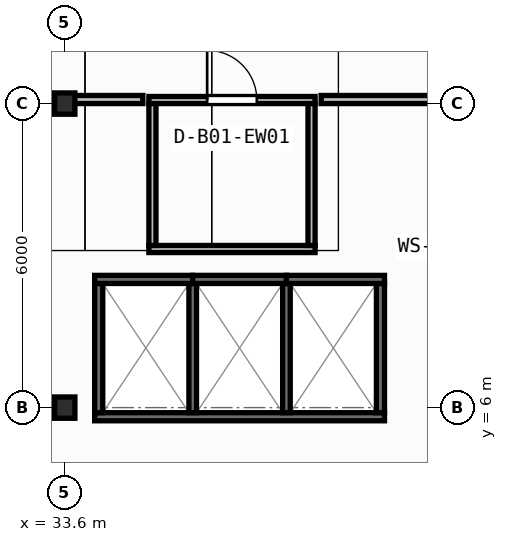
"""IFC4 building model, lengths in metres.
Left out: names, types, materials, properties, quantities, classifications, styles, units other than length and angle.
Written with IfcOpenShell. Run it as: python <this file> out.ifc"""

import sys

from ifc_helpers import new_model, si_unit, direction, frame, frame_2d, origin, origin_2d, place, context, subcontext, project, spatial, rectangle, i_section, extrude, element, fill, save


model = new_model("IFC4")
c1 = context("Model", 3, precision=1e-05, world=origin(), true_north=direction((0.0, 1.0)))
c2 = subcontext(c1, "Body", "Model", "MODEL_VIEW")
j1 = project(units=[si_unit("LENGTHUNIT", "METRE"), si_unit("PLANEANGLEUNIT", "RADIAN")], contexts=[c1])
p1 = place(None, origin())
s1 = spatial("IfcSite", under=j1, at=p1, CompositionType="ELEMENT")
p2 = place(p1, origin())
s2 = spatial("IfcBuilding", under=s1, at=p2, CompositionType="ELEMENT")
p3 = place(p2, frame((0.0, 0.0, -4.5)))
s3 = spatial("IfcBuildingStorey", under=s2, at=p3, CompositionType="ELEMENT", Elevation=-4.5)
for number, where, z_axis, x_axis in (
    (1, (33.6, 6.0, 0.0), (0.0, 0.0, 1.0), (1.0, 0.0, 0.0)),
    (2, (33.6, 12.0, 0.0), (0.0, 0.0, 1.0), (1.0, 0.0, 0.0)),
):
    element("IfcColumn", number, at=place(p3, frame(where, z_axis=z_axis, x_axis=x_axis)), inside=s3, PredefinedType="COLUMN", context=c2, shape_type="SweptSolid", body=[
        extrude(i_section(OverallWidth=0.4, OverallDepth=0.42, WebThickness=0.025, FlangeThickness=0.04, at=origin_2d()), origin(), (0.0, 0.0, 1.0), 4.5),
    ])
p4 = place(p3, frame((34.19, 5.82, 0.0), z_axis=(0.0, 0.0, 1.0), x_axis=(1.0, 0.0, 0.0)))
e3 = element("IfcWall", 3, at=p4, inside=s3, PredefinedType="SHEAR", context=c2, shape_type="SweptSolid", body=[
    extrude(rectangle(XDim=5.72, YDim=0.16, at=frame_2d((2.86, 0.0))), origin(), (0.0, 0.0, 1.0), 4.25),
])
for number, where, z_axis, x_axis in (
    (4, (34.27, 5.9, 0.0), (0.0, 0.0, 1.0), (0.0, 1.0, 0.0)),
    (5, (39.83, 5.9, 0.0), (0.0, 0.0, 1.0), (0.0, 1.0, 0.0)),
):
    element("IfcWall", number, at=place(p3, frame(where, z_axis=z_axis, x_axis=x_axis)), inside=s3, PredefinedType="SHEAR", context=c2, shape_type="SweptSolid", body=[
        extrude(rectangle(XDim=2.55, YDim=0.16, at=frame_2d((1.275, 0.0))), origin(), (0.0, 0.0, 1.0), 4.25),
    ])
for number, where, z_axis, x_axis in (
    (6, (36.125, 5.9, 0.0), (0.0, 0.0, 1.0), (0.0, 1.0, 0.0)),
    (7, (37.975, 5.9, 0.0), (0.0, 0.0, 1.0), (0.0, 1.0, 0.0)),
):
    element("IfcWall", number, at=place(p3, frame(where, z_axis=z_axis, x_axis=x_axis)), inside=s3, PredefinedType="SHEAR", context=c2, shape_type="SweptSolid", body=[
        extrude(rectangle(XDim=2.55, YDim=0.15, at=frame_2d((1.275, 0.0))), origin(), (0.0, 0.0, 1.0), 4.25),
    ])
p5 = place(p3, frame((34.19, 8.53, 0.0), z_axis=(0.0, 0.0, 1.0), x_axis=(1.0, 0.0, 0.0)))
e8 = element("IfcWall", 8, at=p5, inside=s3, PredefinedType="SHEAR", context=c2, shape_type="SweptSolid", body=[
    extrude(rectangle(XDim=1.935, YDim=0.16, at=frame_2d((0.968, 0.0))), origin(), (0.0, 0.0, 1.0), 4.25),
])
p6 = place(p3, frame((36.125, 8.53, 0.0), z_axis=(0.0, 0.0, 1.0), x_axis=(1.0, 0.0, 0.0)))
e9 = element("IfcWall", 9, at=p6, inside=s3, PredefinedType="SHEAR", context=c2, shape_type="SweptSolid", body=[
    extrude(rectangle(XDim=1.85, YDim=0.16, at=frame_2d((0.925, 0.0))), origin(), (0.0, 0.0, 1.0), 4.25),
])
p7 = place(p3, frame((37.975, 8.53, 0.0), z_axis=(0.0, 0.0, 1.0), x_axis=(1.0, 0.0, 0.0)))
e10 = element("IfcWall", 10, at=p7, inside=s3, PredefinedType="SHEAR", context=c2, shape_type="SweptSolid", body=[
    extrude(rectangle(XDim=1.935, YDim=0.16, at=frame_2d((0.967, 0.0))), origin(), (0.0, 0.0, 1.0), 4.25),
])
p8 = place(p3, frame((35.26, 9.13, 0.0), z_axis=(0.0, 0.0, 1.0), x_axis=(1.0, 0.0, 0.0)))
e11 = element("IfcWall", 11, at=p8, inside=s3, PredefinedType="PARTITIONING", context=c2, shape_type="SweptSolid", body=[
    extrude(rectangle(XDim=3.28, YDim=0.14, at=frame_2d((1.64, 0.0))), origin(), (0.0, 0.0, 1.0), 3.969),
])
p9 = place(p3, frame((35.26, 12.07, 0.0), z_axis=(0.0, 0.0, 1.0), x_axis=(1.0, 0.0, 0.0)))
e12 = element("IfcWall", 12, at=p9, inside=s3, PredefinedType="PARTITIONING", context=c2, shape_type="SweptSolid", body=[
    extrude(rectangle(XDim=3.28, YDim=0.14, at=frame_2d((1.64, 0.0))), origin(), (0.0, 0.0, 1.0), 3.315),
])
p10 = place(p9, frame((1.15, 0.0, 0.0)))
e13 = element("IfcOpeningElement", 13, at=p10, cuts=e12, PredefinedType="OPENING", context=c2, shape_type="SweptSolid", body=[
    extrude(rectangle(XDim=0.98, YDim=2.1, at=frame_2d((0.49, 1.05))), frame((0.0, 0.08, 0.0), z_axis=(0.0, -1.0, 0.0), x_axis=(1.0, 0.0, 0.0)), (0.0, 0.0, 1.0), 0.16),
])
for number, where, z_axis, x_axis in (
    (14, (35.33, 9.2, 0.0), (0.0, 0.0, 1.0), (0.0, 1.0, 0.0)),
    (15, (38.47, 9.2, 0.0), (0.0, 0.0, 1.0), (0.0, 1.0, 0.0)),
):
    element("IfcWall", number, at=place(p3, frame(where, z_axis=z_axis, x_axis=x_axis)), inside=s3, PredefinedType="PARTITIONING", context=c2, shape_type="SweptSolid", body=[
        extrude(rectangle(XDim=2.8, YDim=0.14, at=frame_2d((1.4, 0.0))), origin(), (0.0, 0.0, 1.0), 4.25),
    ])
p11 = place(p3, frame((31.63, 12.08, 0.0), z_axis=(0.0, 0.0, 1.0), x_axis=(1.0, 0.0, 0.0)))
e16 = element("IfcWall", 16, at=p11, inside=s3, PredefinedType="PARTITIONING", context=c2, shape_type="SweptSolid", body=[
    extrude(rectangle(XDim=3.51, YDim=0.16, at=frame_2d((1.755, 0.0))), origin(), (0.0, 0.0, 1.0), 3.315),
])
p12 = place(p3, frame((38.659, 12.08, 0.0), z_axis=(0.0, 0.0, 1.0), x_axis=(1.0, 0.0, 0.0)))
e17 = element("IfcWall", 17, at=p12, inside=s3, PredefinedType="PARTITIONING", context=c2, shape_type="SweptSolid", body=[
    extrude(rectangle(XDim=4.151, YDim=0.16, at=frame_2d((2.076, 0.0))), origin(), (0.0, 0.0, 1.0), 3.315),
])
p13 = place(p10, origin())
e18 = element("IfcDoor", 18, at=p13, inside=s3, OperationType="SINGLE_SWING_LEFT", PredefinedType="DOOR", context=c2, shape_type="SweptSolid", body=[
    extrude(rectangle(XDim=0.98, YDim=2.1, at=frame_2d((0.49, 1.05))), frame((0.0, 0.025, 0.0), z_axis=(0.0, -1.0, 0.0), x_axis=(1.0, 0.0, 0.0)), (0.0, 0.0, 1.0), 0.05),
])
fill(e13, e18)
save(model, sys.argv[1])
